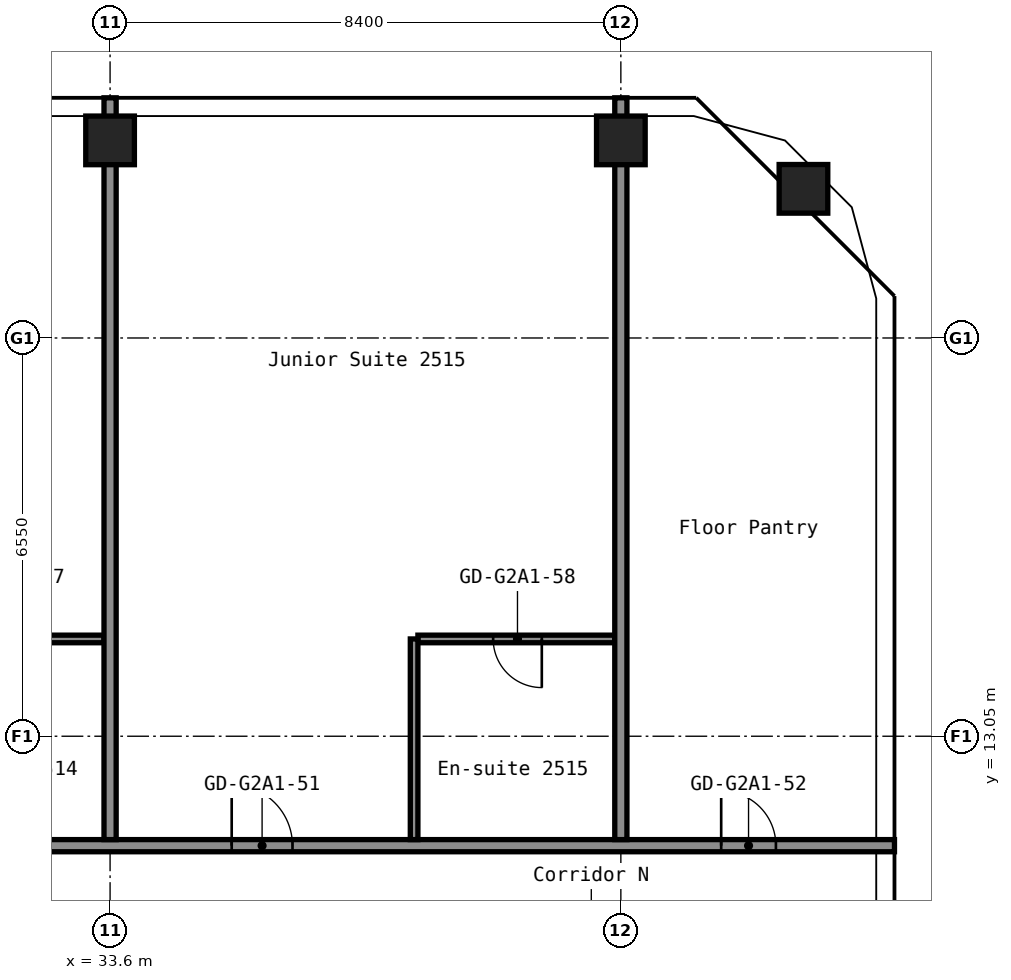
"""IFC4 building model, lengths in metres.
Left out: names, types, materials, properties, quantities, classifications, styles, units other than length and angle.
Written with IfcOpenShell. Run it as: python <this file> out.ifc"""

import sys

from ifc_helpers import new_model, si_unit, direction, frame, frame_2d, origin, origin_2d, place, context, subcontext, project, spatial, rectangle, hollow_rectangle, extrude, element, fill, save


model = new_model("IFC4")
c1 = context("Model", 3, precision=1e-05, world=origin(), true_north=direction((0.0, 1.0)))
c2 = subcontext(c1, "Body", "Model", "MODEL_VIEW")
j1 = project(units=[si_unit("LENGTHUNIT", "METRE"), si_unit("PLANEANGLEUNIT", "RADIAN")], contexts=[c1])
p1 = place(None, origin())
s1 = spatial("IfcSite", under=j1, at=p1, CompositionType="ELEMENT")
p2 = place(p1, origin())
s2 = spatial("IfcBuilding", under=s1, at=p2, CompositionType="ELEMENT")
p3 = place(p2, frame((0.0, 0.0, 91.4)))
s3 = spatial("IfcBuildingStorey", under=s2, at=p3, CompositionType="ELEMENT", Elevation=91.4)
for number, where, z_axis, x_axis in (
    (1, (33.6, 22.85, 0.0), (0.0, 0.0, 1.0), (1.0, 0.0, 0.0)),
    (2, (42.0, 22.85, 0.0), (0.0, 0.0, 1.0), (1.0, 0.0, 0.0)),
    (3, (45.003, 22.053, 0.0), (0.0, 0.0, 1.0), (1.0, 0.0, 0.0)),
):
    element("IfcColumn", number, at=place(p3, frame(where, z_axis=z_axis, x_axis=x_axis)), inside=s3, PredefinedType="COLUMN", context=c2, shape_type="SweptSolid", body=[
        extrude(hollow_rectangle(XDim=0.8, YDim=0.8, WallThickness=0.032, at=origin_2d()), origin(), (0.0, 0.0, 1.0), 2.8),
    ])
p4 = place(p3, frame((16.8, 11.25, 0.0), z_axis=(0.0, 0.0, 1.0), x_axis=(1.0, 0.0, 0.0)))
e4 = element("IfcWall", 4, at=p4, inside=s3, PredefinedType="PARTITIONING", context=c2, shape_type="SweptSolid", body=[
    extrude(rectangle(XDim=29.7, YDim=0.2, at=frame_2d((14.85, 0.0))), origin(), (0.0, 0.0, 1.0), 2.8),
])
p5 = place(p4, frame((2.0, 0.0, 0.0)))
e5 = element("IfcOpeningElement", 5, at=p5, cuts=e4, PredefinedType="OPENING", context=c2, shape_type="SweptSolid", body=[
    extrude(rectangle(XDim=1.0, YDim=2.1, at=frame_2d((0.5, 1.05))), frame((0.0, 0.11, 0.0), z_axis=(0.0, -1.0, 0.0), x_axis=(1.0, 0.0, 0.0)), (0.0, 0.0, 1.0), 0.22),
])
p6 = place(p4, frame((10.4, 0.0, 0.0)))
e6 = element("IfcOpeningElement", 6, at=p6, cuts=e4, PredefinedType="OPENING", context=c2, shape_type="SweptSolid", body=[
    extrude(rectangle(XDim=1.0, YDim=2.1, at=frame_2d((0.5, 1.05))), frame((0.0, 0.11, 0.0), z_axis=(0.0, -1.0, 0.0), x_axis=(1.0, 0.0, 0.0)), (0.0, 0.0, 1.0), 0.22),
])
p7 = place(p4, frame((18.8, 0.0, 0.0)))
e7 = element("IfcOpeningElement", 7, at=p7, cuts=e4, PredefinedType="OPENING", context=c2, shape_type="SweptSolid", body=[
    extrude(rectangle(XDim=1.0, YDim=2.1, at=frame_2d((0.5, 1.05))), frame((0.0, 0.11, 0.0), z_axis=(0.0, -1.0, 0.0), x_axis=(1.0, 0.0, 0.0)), (0.0, 0.0, 1.0), 0.22),
])
p8 = place(p4, frame((26.85, 0.0, 0.0)))
e8 = element("IfcOpeningElement", 8, at=p8, cuts=e4, PredefinedType="OPENING", context=c2, shape_type="SweptSolid", body=[
    extrude(rectangle(XDim=0.9, YDim=2.1, at=frame_2d((0.45, 1.05))), frame((0.0, 0.11, 0.0), z_axis=(0.0, -1.0, 0.0), x_axis=(1.0, 0.0, 0.0)), (0.0, 0.0, 1.0), 0.22),
])
p9 = place(p3, frame((30.262, 14.65, 0.0), z_axis=(0.0, 0.0, 1.0), x_axis=(1.0, 0.0, 0.0)))
e9 = element("IfcWall", 9, at=p9, inside=s3, PredefinedType="PARTITIONING", context=c2, shape_type="SweptSolid", body=[
    extrude(rectangle(XDim=3.238, YDim=0.125, at=frame_2d((1.619, 0.0))), origin(), (0.0, 0.0, 1.0), 2.8),
])
p10 = place(p9, frame((1.238, 0.0, 0.0)))
e10 = element("IfcOpeningElement", 10, at=p10, cuts=e9, PredefinedType="OPENING", context=c2, shape_type="SweptSolid", body=[
    extrude(rectangle(XDim=0.8, YDim=2.1, at=frame_2d((0.4, 1.05))), frame((0.0, 0.073, 0.0), z_axis=(0.0, -1.0, 0.0), x_axis=(1.0, 0.0, 0.0)), (0.0, 0.0, 1.0), 0.145),
])
p11 = place(p3, frame((38.663, 14.65, 0.0), z_axis=(0.0, 0.0, 1.0), x_axis=(1.0, 0.0, 0.0)))
e11 = element("IfcWall", 11, at=p11, inside=s3, PredefinedType="PARTITIONING", context=c2, shape_type="SweptSolid", body=[
    extrude(rectangle(XDim=3.237, YDim=0.125, at=frame_2d((1.619, 0.0))), origin(), (0.0, 0.0, 1.0), 2.8),
])
p12 = place(p11, frame((1.238, 0.0, 0.0)))
e12 = element("IfcOpeningElement", 12, at=p12, cuts=e11, PredefinedType="OPENING", context=c2, shape_type="SweptSolid", body=[
    extrude(rectangle(XDim=0.8, YDim=2.1, at=frame_2d((0.4, 1.05))), frame((0.0, 0.073, 0.0), z_axis=(0.0, -1.0, 0.0), x_axis=(1.0, 0.0, 0.0)), (0.0, 0.0, 1.0), 0.145),
])
p13 = place(p3, frame((33.6, 11.35, 0.0), z_axis=(0.0, 0.0, 1.0), x_axis=(0.0, 1.0, 0.0)))
e13 = element("IfcWall", 13, at=p13, inside=s3, PredefinedType="PARTITIONING", context=c2, shape_type="SweptSolid", body=[
    extrude(rectangle(XDim=12.2, YDim=0.2, at=frame_2d((6.1, 0.0))), origin(), (0.0, 0.0, 1.0), 2.8),
])
p14 = place(p3, frame((38.6, 11.35, 0.0), z_axis=(0.0, 0.0, 1.0), x_axis=(0.0, 1.0, 0.0)))
e14 = element("IfcWall", 14, at=p14, inside=s3, PredefinedType="PARTITIONING", context=c2, shape_type="SweptSolid", body=[
    extrude(rectangle(XDim=3.3, YDim=0.125, at=frame_2d((1.65, 0.0))), origin(), (0.0, 0.0, 1.0), 2.8),
])
p15 = place(p3, frame((42.0, 11.35, 0.0), z_axis=(0.0, 0.0, 1.0), x_axis=(0.0, 1.0, 0.0)))
e15 = element("IfcWall", 15, at=p15, inside=s3, PredefinedType="PARTITIONING", context=c2, shape_type="SweptSolid", body=[
    extrude(rectangle(XDim=12.2, YDim=0.2, at=frame_2d((6.1, 0.0))), origin(), (0.0, 0.0, 1.0), 2.8),
])
p16 = place(p7, origin())
e16 = element("IfcDoor", 16, at=p16, inside=s3, OperationType="SINGLE_SWING_RIGHT", PredefinedType="DOOR", context=c2, shape_type="SweptSolid", body=[
    extrude(rectangle(XDim=1.0, YDim=2.1, at=frame_2d((0.5, 1.05))), frame((0.0, 0.025, 0.0), z_axis=(0.0, -1.0, 0.0), x_axis=(1.0, 0.0, 0.0)), (0.0, 0.0, 1.0), 0.05),
])
fill(e7, e16)
p17 = place(p8, origin())
e17 = element("IfcDoor", 17, at=p17, inside=s3, OperationType="SINGLE_SWING_RIGHT", PredefinedType="DOOR", context=c2, shape_type="SweptSolid", body=[
    extrude(rectangle(XDim=0.9, YDim=2.1, at=frame_2d((0.45, 1.05))), frame((0.0, 0.025, 0.0), z_axis=(0.0, -1.0, 0.0), x_axis=(1.0, 0.0, 0.0)), (0.0, 0.0, 1.0), 0.05),
])
fill(e8, e17)
p18 = place(p12, origin())
e18 = element("IfcDoor", 18, at=p18, inside=s3, OperationType="SINGLE_SWING_RIGHT", PredefinedType="DOOR", context=c2, shape_type="SweptSolid", body=[
    extrude(rectangle(XDim=0.8, YDim=2.1, at=frame_2d((0.4, 1.05))), frame((0.0, 0.025, 0.0), z_axis=(0.0, -1.0, 0.0), x_axis=(1.0, 0.0, 0.0)), (0.0, 0.0, 1.0), 0.05),
])
fill(e12, e18)
save(model, sys.argv[1])
